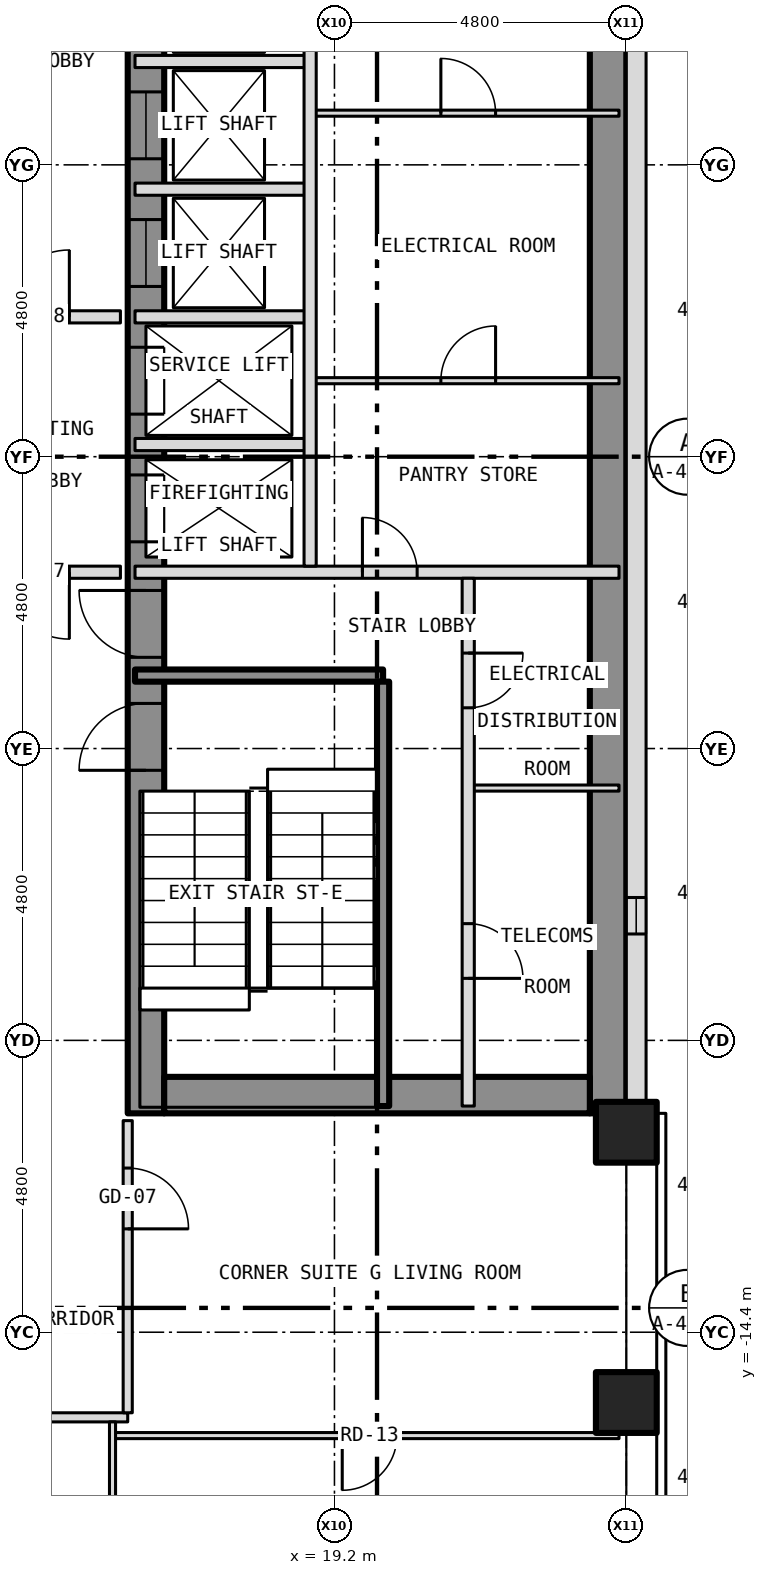
"""IFC4 building model, lengths in metres.
Left out: names, types, materials, properties, quantities, classifications, styles, units other than length and angle.
Written with IfcOpenShell. Run it as: python <this file> out.ifc"""

import sys

from ifc_helpers import new_model, si_unit, direction, frame, frame_2d, origin, origin_2d, place, context, subcontext, project, spatial, rectangle, hollow_rectangle, extrude, element, fill, save


model = new_model("IFC4")
c1 = context("Model", 3, precision=1e-05, world=origin(), true_north=direction((0.0, 1.0)))
c2 = subcontext(c1, "Body", "Model", "MODEL_VIEW")
j1 = project(units=[si_unit("LENGTHUNIT", "METRE"), si_unit("PLANEANGLEUNIT", "RADIAN")], contexts=[c1])
p1 = place(None, origin())
s1 = spatial("IfcSite", under=j1, at=p1, CompositionType="ELEMENT")
p2 = place(p1, origin())
s2 = spatial("IfcBuilding", under=s1, at=p2, CompositionType="ELEMENT")
p3 = place(p2, frame((0.0, 0.0, 70.5)))
s3 = spatial("IfcBuildingStorey", under=s2, at=p3, CompositionType="ELEMENT", Elevation=70.5)
for number, where, z_axis, x_axis in (
    (1, (24.0, -15.556, -0.15), (0.0, 0.0, 1.0), (1.0, 0.0, 0.0)),
    (2, (24.0, -11.111, -0.15), (0.0, 0.0, 1.0), (1.0, 0.0, 0.0)),
):
    element("IfcColumn", number, at=place(p3, frame(where, z_axis=z_axis, x_axis=x_axis)), inside=s3, PredefinedType="COLUMN", context=c2, shape_type="SweptSolid", body=[
        extrude(hollow_rectangle(XDim=1.0, YDim=1.0, WallThickness=0.06, at=origin_2d()), origin(), (0.0, 0.0, 1.0), 3.5),
    ])
p4 = place(p3, frame((16.1, -10.8, 0.0), z_axis=(0.0, 0.0, 1.0), x_axis=(0.0, 1.0, 0.0)))
e3 = element("IfcWall", 3, at=p4, inside=s3, PredefinedType="SHEAR", context=c2, shape_type="SweptSolid", body=[
    extrude(rectangle(XDim=21.6, YDim=0.6, at=frame_2d((10.8, 0.0))), origin(), (0.0, 0.0, 1.0), 3.25),
])
p5 = place(p4, frame((9.4, 0.0, 0.0)))
e4 = element("IfcOpeningElement", 4, at=p5, cuts=e3, PredefinedType="OPENING", context=c2, shape_type="SweptSolid", body=[
    extrude(rectangle(XDim=1.1, YDim=2.1, at=frame_2d((0.55, 1.05))), frame((0.0, 0.312, 0.0), z_axis=(0.0, -1.0, 0.0), x_axis=(1.0, 0.0, 0.0)), (0.0, 0.0, 1.0), 0.624),
])
p6 = place(p4, frame((11.5, 0.0, 0.0)))
e5 = element("IfcOpeningElement", 5, at=p6, cuts=e3, PredefinedType="OPENING", context=c2, shape_type="SweptSolid", body=[
    extrude(rectangle(XDim=1.1, YDim=2.1, at=frame_2d((0.55, 1.05))), frame((0.0, 0.312, 0.0), z_axis=(0.0, -1.0, 0.0), x_axis=(1.0, 0.0, 0.0)), (0.0, 0.0, 1.0), 0.624),
])
p7 = place(p4, frame((13.6, 0.0, 0.0)))
e6 = element("IfcOpeningElement", 6, at=p7, cuts=e3, PredefinedType="OPENING", context=c2, shape_type="SweptSolid", body=[
    extrude(rectangle(XDim=1.1, YDim=2.1, at=frame_2d((0.55, 1.05))), frame((0.0, 0.312, 0.0), z_axis=(0.0, -1.0, 0.0), x_axis=(1.0, 0.0, 0.0)), (0.0, 0.0, 1.0), 0.624),
])
p8 = place(p4, frame((15.7, 0.0, 0.0)))
e7 = element("IfcOpeningElement", 7, at=p8, cuts=e3, PredefinedType="OPENING", context=c2, shape_type="SweptSolid", body=[
    extrude(rectangle(XDim=1.1, YDim=2.1, at=frame_2d((0.55, 1.05))), frame((0.0, 0.312, 0.0), z_axis=(0.0, -1.0, 0.0), x_axis=(1.0, 0.0, 0.0)), (0.0, 0.0, 1.0), 0.624),
])
p9 = place(p4, frame((17.8, 0.0, 0.0)))
e8 = element("IfcOpeningElement", 8, at=p9, cuts=e3, PredefinedType="OPENING", context=c2, shape_type="SweptSolid", body=[
    extrude(rectangle(XDim=1.1, YDim=2.1, at=frame_2d((0.55, 1.05))), frame((0.0, 0.312, 0.0), z_axis=(0.0, -1.0, 0.0), x_axis=(1.0, 0.0, 0.0)), (0.0, 0.0, 1.0), 0.624),
])
p10 = place(p4, frame((5.642, 0.0, 0.0)))
e9 = element("IfcOpeningElement", 9, at=p10, cuts=e3, PredefinedType="OPENING", context=c2, shape_type="SweptSolid", body=[
    extrude(rectangle(XDim=1.1, YDim=2.1, at=frame_2d((0.55, 1.05))), frame((0.0, 0.312, 0.0), z_axis=(0.0, -1.0, 0.0), x_axis=(1.0, 0.0, 0.0)), (0.0, 0.0, 1.0), 0.624),
])
p11 = place(p4, frame((7.5, 0.0, 0.0)))
e10 = element("IfcOpeningElement", 10, at=p11, cuts=e3, PredefinedType="OPENING", context=c2, shape_type="SweptSolid", body=[
    extrude(rectangle(XDim=1.1, YDim=2.1, at=frame_2d((0.55, 1.05))), frame((0.0, 0.312, 0.0), z_axis=(0.0, -1.0, 0.0), x_axis=(1.0, 0.0, 0.0)), (0.0, 0.0, 1.0), 0.624),
])
p12 = place(p3, frame((23.7, -10.8, 0.0), z_axis=(0.0, 0.0, 1.0), x_axis=(0.0, 1.0, 0.0)))
e11 = element("IfcWall", 11, at=p12, inside=s3, PredefinedType="SHEAR", context=c2, shape_type="SweptSolid", body=[
    extrude(rectangle(XDim=21.6, YDim=0.6, at=frame_2d((10.8, 0.0))), origin(), (0.0, 0.0, 1.0), 3.25),
])
p13 = place(p3, frame((16.4, -10.5, 0.0), z_axis=(0.0, 0.0, 1.0), x_axis=(1.0, 0.0, 0.0)))
e12 = element("IfcWall", 12, at=p13, inside=s3, PredefinedType="SHEAR", context=c2, shape_type="SweptSolid", body=[
    extrude(rectangle(XDim=7.0, YDim=0.6, at=frame_2d((3.5, 0.0))), origin(), (0.0, 0.0, 1.0), 3.25),
])
p14 = place(p3, frame((24.163, -10.8, 0.0), z_axis=(0.0, 0.0, 1.0), x_axis=(0.0, 1.0, 0.0)))
e13 = element("IfcWall", 13, at=p14, inside=s3, PredefinedType="SOLIDWALL", context=c2, shape_type="SweptSolid", body=[
    extrude(rectangle(XDim=21.6, YDim=0.325, at=frame_2d((10.8, 0.0))), origin(), (0.0, 0.0, 1.0), 3.5),
])
p15 = place(p14, frame((2.95, 0.0, 1.0)))
e14 = element("IfcOpeningElement", 14, at=p15, cuts=e13, PredefinedType="OPENING", context=c2, shape_type="SweptSolid", body=[
    extrude(rectangle(XDim=0.6, YDim=1.5, at=frame_2d((0.3, 0.75))), frame((0.0, 0.175, 0.0), z_axis=(0.0, -1.0, 0.0), x_axis=(1.0, 0.0, 0.0)), (0.0, 0.0, 1.0), 0.349),
])
p16 = place(p3, frame((15.55, -16.1, 0.0), z_axis=(0.0, 0.0, 1.0), x_axis=(1.0, 0.0, 0.0)))
e15 = element("IfcWall", 15, at=p16, inside=s3, PredefinedType="PARTITIONING", context=c2, shape_type="SweptSolid", body=[
    extrude(rectangle(XDim=8.33, YDim=0.1, at=frame_2d((4.165, 0.0))), origin(), (0.0, 0.0, 1.0), 3.35),
])
p17 = place(p16, frame((3.778, 0.0, 0.0)))
e16 = element("IfcOpeningElement", 16, at=p17, cuts=e15, PredefinedType="OPENING", context=c2, shape_type="SweptSolid", body=[
    extrude(rectangle(XDim=0.9, YDim=2.1, at=frame_2d((0.45, 1.05))), frame((0.0, 0.062, 0.0), z_axis=(0.0, -1.0, 0.0), x_axis=(1.0, 0.0, 0.0)), (0.0, 0.0, 1.0), 0.124),
])
p18 = place(p3, frame((9.15, -15.8, 0.0), z_axis=(0.0, 0.0, 1.0), x_axis=(1.0, 0.0, 0.0)))
e17 = element("IfcWall", 17, at=p18, inside=s3, PredefinedType="PARTITIONING", context=c2, shape_type="SweptSolid", body=[
    extrude(rectangle(XDim=6.65, YDim=0.15, at=frame_2d((3.325, 0.0))), origin(), (0.0, 0.0, 1.0), 3.35),
])
p19 = place(p18, frame((3.803, 0.0, 0.0)))
e18 = element("IfcOpeningElement", 18, at=p19, cuts=e17, PredefinedType="OPENING", context=c2, shape_type="SweptSolid", body=[
    extrude(rectangle(XDim=1.0, YDim=2.1, at=frame_2d((0.5, 1.05))), frame((0.0, 0.087, 0.0), z_axis=(0.0, -1.0, 0.0), x_axis=(1.0, 0.0, 0.0)), (0.0, 0.0, 1.0), 0.174),
])
p20 = place(p3, frame((21.4, -5.45, 0.0), z_axis=(0.0, 0.0, 1.0), x_axis=(1.0, 0.0, 0.0)))
e19 = element("IfcWall", 19, at=p20, inside=s3, PredefinedType="PARTITIONING", context=c2, shape_type="SweptSolid", body=[
    extrude(rectangle(XDim=2.48, YDim=0.1, at=frame_2d((1.24, 0.0))), origin(), (0.0, 0.0, 1.0), 3.25),
])
p21 = place(p3, frame((15.92, -3.6, 0.0), z_axis=(0.0, 0.0, 1.0), x_axis=(1.0, 0.0, 0.0)))
e20 = element("IfcWall", 20, at=p21, inside=s3, PredefinedType="SHEAR", context=c2, shape_type="SweptSolid", body=[
    extrude(rectangle(XDim=4.08, YDim=0.2, at=frame_2d((2.04, 0.0))), origin(), (0.0, 0.0, 1.0), 3.25),
])
p22 = place(p3, frame((12.4, -1.9, 0.0), z_axis=(0.0, 0.0, 1.0), x_axis=(1.0, 0.0, 0.0)))
e21 = element("IfcWall", 21, at=p22, inside=s3, PredefinedType="PARTITIONING", context=c2, shape_type="SweptSolid", body=[
    extrude(rectangle(XDim=3.28, YDim=0.2, at=frame_2d((1.64, 0.0))), origin(), (0.0, 0.0, 1.0), 3.35),
])
p23 = place(p22, frame((1.34, 0.0, 0.0)))
e22 = element("IfcOpeningElement", 22, at=p23, cuts=e21, PredefinedType="OPENING", context=c2, shape_type="SweptSolid", body=[
    extrude(rectangle(XDim=1.1, YDim=2.1, at=frame_2d((0.55, 1.05))), frame((0.0, 0.112, 0.0), z_axis=(0.0, -1.0, 0.0), x_axis=(1.0, 0.0, 0.0)), (0.0, 0.0, 1.0), 0.224),
])
p24 = place(p3, frame((15.92, -1.9, 0.0), z_axis=(0.0, 0.0, 1.0), x_axis=(1.0, 0.0, 0.0)))
e23 = element("IfcWall", 23, at=p24, inside=s3, PredefinedType="PARTITIONING", context=c2, shape_type="SweptSolid", body=[
    extrude(rectangle(XDim=7.96, YDim=0.2, at=frame_2d((3.98, 0.0))), origin(), (0.0, 0.0, 1.0), 3.25),
])
p25 = place(p24, frame((3.74, 0.0, 0.0)))
e24 = element("IfcOpeningElement", 24, at=p25, cuts=e23, PredefinedType="OPENING", context=c2, shape_type="SweptSolid", body=[
    extrude(rectangle(XDim=0.9, YDim=2.1, at=frame_2d((0.45, 1.05))), frame((0.0, 0.112, 0.0), z_axis=(0.0, -1.0, 0.0), x_axis=(1.0, 0.0, 0.0)), (0.0, 0.0, 1.0), 0.224),
])
p26 = place(p3, frame((15.92, 0.2, 0.0), z_axis=(0.0, 0.0, 1.0), x_axis=(1.0, 0.0, 0.0)))
e25 = element("IfcWall", 25, at=p26, inside=s3, PredefinedType="PARTITIONING", context=c2, shape_type="SweptSolid", body=[
    extrude(rectangle(XDim=2.88, YDim=0.2, at=frame_2d((1.44, 0.0))), origin(), (0.0, 0.0, 1.0), 3.25),
])
p27 = place(p3, frame((18.8, 1.25, 0.0), z_axis=(0.0, 0.0, 1.0), x_axis=(1.0, 0.0, 0.0)))
e26 = element("IfcWall", 26, at=p27, inside=s3, PredefinedType="PARTITIONING", context=c2, shape_type="SweptSolid", body=[
    extrude(rectangle(XDim=5.08, YDim=0.1, at=frame_2d((2.54, 0.0))), origin(), (0.0, 0.0, 1.0), 3.25),
])
p28 = place(p27, frame((2.15, 0.0, 0.0)))
e27 = element("IfcOpeningElement", 27, at=p28, cuts=e26, PredefinedType="OPENING", context=c2, shape_type="SweptSolid", body=[
    extrude(rectangle(XDim=0.9, YDim=2.1, at=frame_2d((0.45, 1.05))), frame((0.0, 0.062, 0.0), z_axis=(0.0, -1.0, 0.0), x_axis=(1.0, 0.0, 0.0)), (0.0, 0.0, 1.0), 0.124),
])
p29 = place(p3, frame((12.4, 2.3, 0.0), z_axis=(0.0, 0.0, 1.0), x_axis=(1.0, 0.0, 0.0)))
e28 = element("IfcWall", 28, at=p29, inside=s3, PredefinedType="PARTITIONING", context=c2, shape_type="SweptSolid", body=[
    extrude(rectangle(XDim=3.28, YDim=0.2, at=frame_2d((1.64, 0.0))), origin(), (0.0, 0.0, 1.0), 3.35),
])
p30 = place(p29, frame((1.34, 0.0, 0.0)))
e29 = element("IfcOpeningElement", 29, at=p30, cuts=e28, PredefinedType="OPENING", context=c2, shape_type="SweptSolid", body=[
    extrude(rectangle(XDim=1.1, YDim=2.1, at=frame_2d((0.55, 1.05))), frame((0.0, 0.112, 0.0), z_axis=(0.0, -1.0, 0.0), x_axis=(1.0, 0.0, 0.0)), (0.0, 0.0, 1.0), 0.224),
])
for number, where, z_axis, x_axis in (
    (30, (15.92, 2.3, 0.0), (0.0, 0.0, 1.0), (1.0, 0.0, 0.0)),
    (31, (15.92, 4.4, 0.0), (0.0, 0.0, 1.0), (1.0, 0.0, 0.0)),
):
    element("IfcWall", number, at=place(p3, frame(where, z_axis=z_axis, x_axis=x_axis)), inside=s3, PredefinedType="PARTITIONING", context=c2, shape_type="SweptSolid", body=[
        extrude(rectangle(XDim=2.88, YDim=0.2, at=frame_2d((1.44, 0.0))), origin(), (0.0, 0.0, 1.0), 3.25),
    ])
p31 = place(p3, frame((18.8, 5.65, 0.0), z_axis=(0.0, 0.0, 1.0), x_axis=(1.0, 0.0, 0.0)))
e32 = element("IfcWall", 32, at=p31, inside=s3, PredefinedType="PARTITIONING", context=c2, shape_type="SweptSolid", body=[
    extrude(rectangle(XDim=5.08, YDim=0.1, at=frame_2d((2.54, 0.0))), origin(), (0.0, 0.0, 1.0), 3.25),
])
p32 = place(p31, frame((2.15, 0.0, 0.0)))
e33 = element("IfcOpeningElement", 33, at=p32, cuts=e32, PredefinedType="OPENING", context=c2, shape_type="SweptSolid", body=[
    extrude(rectangle(XDim=0.9, YDim=2.1, at=frame_2d((0.45, 1.05))), frame((0.0, 0.062, 0.0), z_axis=(0.0, -1.0, 0.0), x_axis=(1.0, 0.0, 0.0)), (0.0, 0.0, 1.0), 0.124),
])
p33 = place(p3, frame((15.92, 6.5, 0.0), z_axis=(0.0, 0.0, 1.0), x_axis=(1.0, 0.0, 0.0)))
e34 = element("IfcWall", 34, at=p33, inside=s3, PredefinedType="PARTITIONING", context=c2, shape_type="SweptSolid", body=[
    extrude(rectangle(XDim=2.88, YDim=0.2, at=frame_2d((1.44, 0.0))), origin(), (0.0, 0.0, 1.0), 3.25),
])
p34 = place(p3, frame((15.55, -23.88, 0.0), z_axis=(0.0, 0.0, 1.0), x_axis=(0.0, 1.0, 0.0)))
e35 = element("IfcWall", 35, at=p34, inside=s3, PredefinedType="PARTITIONING", context=c2, shape_type="SweptSolid", body=[
    extrude(rectangle(XDim=8.005, YDim=0.1, at=frame_2d((4.002, 0.0))), origin(), (0.0, 0.0, 1.0), 3.35),
])
p35 = place(p3, frame((15.8, -15.725, 0.0), z_axis=(0.0, 0.0, 1.0), x_axis=(0.0, 1.0, 0.0)))
e36 = element("IfcWall", 36, at=p35, inside=s3, PredefinedType="PARTITIONING", context=c2, shape_type="SweptSolid", body=[
    extrude(rectangle(XDim=4.805, YDim=0.15, at=frame_2d((2.403, 0.0))), origin(), (0.0, 0.0, 1.0), 3.35),
])
p36 = place(p35, frame((3.025, 0.0, 0.0)))
e37 = element("IfcOpeningElement", 37, at=p36, cuts=e36, PredefinedType="OPENING", context=c2, shape_type="SweptSolid", body=[
    extrude(rectangle(XDim=1.0, YDim=2.1, at=frame_2d((0.5, 1.05))), frame((0.0, 0.087, 0.0), z_axis=(0.0, -1.0, 0.0), x_axis=(1.0, 0.0, 0.0)), (0.0, 0.0, 1.0), 0.174),
])
p37 = place(p3, frame((18.8, -1.8, 0.0), z_axis=(0.0, 0.0, 1.0), x_axis=(0.0, 1.0, 0.0)))
e38 = element("IfcWall", 38, at=p37, inside=s3, PredefinedType="PARTITIONING", context=c2, shape_type="SweptSolid", body=[
    extrude(rectangle(XDim=12.48, YDim=0.2, at=frame_2d((6.24, 0.0))), origin(), (0.0, 0.0, 1.0), 3.25),
])
p38 = place(p3, frame((20.0, -10.68, 0.0), z_axis=(0.0, 0.0, 1.0), x_axis=(0.0, 1.0, 0.0)))
e39 = element("IfcWall", 39, at=p38, inside=s3, PredefinedType="SHEAR", context=c2, shape_type="SweptSolid", body=[
    extrude(rectangle(XDim=6.98, YDim=0.2, at=frame_2d((3.49, 0.0))), origin(), (0.0, 0.0, 1.0), 3.25),
])
p39 = place(p3, frame((21.4, -10.68, 0.0), z_axis=(0.0, 0.0, 1.0), x_axis=(0.0, 1.0, 0.0)))
e40 = element("IfcWall", 40, at=p39, inside=s3, PredefinedType="PARTITIONING", context=c2, shape_type="SweptSolid", body=[
    extrude(rectangle(XDim=8.68, YDim=0.2, at=frame_2d((4.34, 0.0))), origin(), (0.0, 0.0, 1.0), 3.25),
])
p40 = place(p39, frame((2.1, 0.0, 0.0)))
e41 = element("IfcOpeningElement", 41, at=p40, cuts=e40, PredefinedType="OPENING", context=c2, shape_type="SweptSolid", body=[
    extrude(rectangle(XDim=0.9, YDim=2.1, at=frame_2d((0.45, 1.05))), frame((0.0, 0.112, 0.0), z_axis=(0.0, -1.0, 0.0), x_axis=(1.0, 0.0, 0.0)), (0.0, 0.0, 1.0), 0.224),
])
p41 = place(p39, frame((6.55, 0.0, 0.0)))
e42 = element("IfcOpeningElement", 42, at=p41, cuts=e40, PredefinedType="OPENING", context=c2, shape_type="SweptSolid", body=[
    extrude(rectangle(XDim=0.9, YDim=2.1, at=frame_2d((0.45, 1.05))), frame((0.0, 0.112, 0.0), z_axis=(0.0, -1.0, 0.0), x_axis=(1.0, 0.0, 0.0)), (0.0, 0.0, 1.0), 0.224),
])
p42 = place(p15, origin())
e43 = element("IfcWindow", 43, at=p42, inside=s3, PartitioningType="SINGLE_PANEL", PredefinedType="WINDOW", context=c2, shape_type="SweptSolid", body=[
    extrude(rectangle(XDim=0.6, YDim=1.5, at=frame_2d((0.3, 0.75))), frame((0.0, -0.073, 0.0), z_axis=(0.0, -1.0, 0.0), x_axis=(1.0, 0.0, 0.0)), (0.0, 0.0, 1.0), 0.06),
])
fill(e14, e43)
p43 = place(p5, origin())
e44 = element("IfcDoor", 44, at=p43, inside=s3, OperationType="SLIDING_TO_LEFT", PredefinedType="DOOR", context=c2, shape_type="SweptSolid", body=[
    extrude(rectangle(XDim=1.1, YDim=2.1, at=frame_2d((0.55, 1.05))), frame((0.0, 0.025, 0.0), z_axis=(0.0, -1.0, 0.0), x_axis=(1.0, 0.0, 0.0)), (0.0, 0.0, 1.0), 0.05),
])
fill(e4, e44)
p44 = place(p6, origin())
e45 = element("IfcDoor", 45, at=p44, inside=s3, OperationType="SLIDING_TO_LEFT", PredefinedType="DOOR", context=c2, shape_type="SweptSolid", body=[
    extrude(rectangle(XDim=1.1, YDim=2.1, at=frame_2d((0.55, 1.05))), frame((0.0, 0.025, 0.0), z_axis=(0.0, -1.0, 0.0), x_axis=(1.0, 0.0, 0.0)), (0.0, 0.0, 1.0), 0.05),
])
fill(e5, e45)
p45 = place(p7, origin())
e46 = element("IfcDoor", 46, at=p45, inside=s3, OperationType="SLIDING_TO_LEFT", PredefinedType="DOOR", context=c2, shape_type="SweptSolid", body=[
    extrude(rectangle(XDim=1.1, YDim=2.1, at=frame_2d((0.55, 1.05))), frame((0.0, 0.025, 0.0), z_axis=(0.0, -1.0, 0.0), x_axis=(1.0, 0.0, 0.0)), (0.0, 0.0, 1.0), 0.05),
])
fill(e6, e46)
p46 = place(p8, origin())
e47 = element("IfcDoor", 47, at=p46, inside=s3, OperationType="SLIDING_TO_LEFT", PredefinedType="DOOR", context=c2, shape_type="SweptSolid", body=[
    extrude(rectangle(XDim=1.1, YDim=2.1, at=frame_2d((0.55, 1.05))), frame((0.0, 0.025, 0.0), z_axis=(0.0, -1.0, 0.0), x_axis=(1.0, 0.0, 0.0)), (0.0, 0.0, 1.0), 0.05),
])
fill(e7, e47)
p47 = place(p10, origin())
e48 = element("IfcDoor", 48, at=p47, inside=s3, OperationType="SINGLE_SWING_LEFT", PredefinedType="DOOR", context=c2, shape_type="SweptSolid", body=[
    extrude(rectangle(XDim=1.1, YDim=2.1, at=frame_2d((0.55, 1.05))), frame((0.0, 0.025, 0.0), z_axis=(0.0, -1.0, 0.0), x_axis=(1.0, 0.0, 0.0)), (0.0, 0.0, 1.0), 0.05),
])
fill(e9, e48)
p48 = place(p11, origin())
e49 = element("IfcDoor", 49, at=p48, inside=s3, OperationType="SINGLE_SWING_RIGHT", PredefinedType="DOOR", context=c2, shape_type="SweptSolid", body=[
    extrude(rectangle(XDim=1.1, YDim=2.1, at=frame_2d((0.55, 1.05))), frame((0.0, 0.025, 0.0), z_axis=(0.0, -1.0, 0.0), x_axis=(1.0, 0.0, 0.0)), (0.0, 0.0, 1.0), 0.05),
])
fill(e10, e49)
p49 = place(p40, origin())
e50 = element("IfcDoor", 50, at=p49, inside=s3, OperationType="SINGLE_SWING_LEFT", PredefinedType="DOOR", context=c2, shape_type="SweptSolid", body=[
    extrude(rectangle(XDim=0.9, YDim=2.1, at=frame_2d((0.45, 1.05))), frame((0.0, 0.025, 0.0), z_axis=(0.0, -1.0, 0.0), x_axis=(1.0, 0.0, 0.0)), (0.0, 0.0, 1.0), 0.05),
])
fill(e41, e50)
p50 = place(p41, origin())
e51 = element("IfcDoor", 51, at=p50, inside=s3, OperationType="SINGLE_SWING_RIGHT", PredefinedType="DOOR", context=c2, shape_type="SweptSolid", body=[
    extrude(rectangle(XDim=0.9, YDim=2.1, at=frame_2d((0.45, 1.05))), frame((0.0, 0.025, 0.0), z_axis=(0.0, -1.0, 0.0), x_axis=(1.0, 0.0, 0.0)), (0.0, 0.0, 1.0), 0.05),
])
fill(e42, e51)
p51 = place(p25, origin())
e52 = element("IfcDoor", 52, at=p51, inside=s3, OperationType="SINGLE_SWING_LEFT", PredefinedType="DOOR", context=c2, shape_type="SweptSolid", body=[
    extrude(rectangle(XDim=0.9, YDim=2.1, at=frame_2d((0.45, 1.05))), frame((0.0, 0.025, 0.0), z_axis=(0.0, -1.0, 0.0), x_axis=(1.0, 0.0, 0.0)), (0.0, 0.0, 1.0), 0.05),
])
fill(e24, e52)
p52 = place(p28, origin())
e53 = element("IfcDoor", 53, at=p52, inside=s3, OperationType="SINGLE_SWING_RIGHT", PredefinedType="DOOR", context=c2, shape_type="SweptSolid", body=[
    extrude(rectangle(XDim=0.9, YDim=2.1, at=frame_2d((0.45, 1.05))), frame((0.0, 0.025, 0.0), z_axis=(0.0, -1.0, 0.0), x_axis=(1.0, 0.0, 0.0)), (0.0, 0.0, 1.0), 0.05),
])
fill(e27, e53)
p53 = place(p32, origin())
e54 = element("IfcDoor", 54, at=p53, inside=s3, OperationType="SINGLE_SWING_LEFT", PredefinedType="DOOR", context=c2, shape_type="SweptSolid", body=[
    extrude(rectangle(XDim=0.9, YDim=2.1, at=frame_2d((0.45, 1.05))), frame((0.0, 0.025, 0.0), z_axis=(0.0, -1.0, 0.0), x_axis=(1.0, 0.0, 0.0)), (0.0, 0.0, 1.0), 0.05),
])
fill(e33, e54)
p54 = place(p23, origin())
e55 = element("IfcDoor", 55, at=p54, inside=s3, OperationType="SINGLE_SWING_RIGHT", PredefinedType="DOOR", context=c2, shape_type="SweptSolid", body=[
    extrude(rectangle(XDim=1.1, YDim=2.1, at=frame_2d((0.55, 1.05))), frame((0.0, 0.025, 0.0), z_axis=(0.0, -1.0, 0.0), x_axis=(1.0, 0.0, 0.0)), (0.0, 0.0, 1.0), 0.05),
])
fill(e22, e55)
p55 = place(p30, origin())
e56 = element("IfcDoor", 56, at=p55, inside=s3, OperationType="SINGLE_SWING_RIGHT", PredefinedType="DOOR", context=c2, shape_type="SweptSolid", body=[
    extrude(rectangle(XDim=1.1, YDim=2.1, at=frame_2d((0.55, 1.05))), frame((0.0, 0.025, 0.0), z_axis=(0.0, -1.0, 0.0), x_axis=(1.0, 0.0, 0.0)), (0.0, 0.0, 1.0), 0.05),
])
fill(e29, e56)
p56 = place(p36, origin())
e57 = element("IfcDoor", 57, at=p56, inside=s3, OperationType="SINGLE_SWING_LEFT", PredefinedType="DOOR", context=c2, shape_type="SweptSolid", body=[
    extrude(rectangle(XDim=1.0, YDim=2.1, at=frame_2d((0.5, 1.05))), frame((0.0, 0.025, 0.0), z_axis=(0.0, -1.0, 0.0), x_axis=(1.0, 0.0, 0.0)), (0.0, 0.0, 1.0), 0.05),
])
fill(e37, e57)
p57 = place(p17, origin())
e58 = element("IfcDoor", 58, at=p57, inside=s3, OperationType="SINGLE_SWING_LEFT", PredefinedType="DOOR", context=c2, shape_type="SweptSolid", body=[
    extrude(rectangle(XDim=0.9, YDim=2.1, at=frame_2d((0.45, 1.05))), frame((0.0, 0.025, 0.0), z_axis=(0.0, -1.0, 0.0), x_axis=(1.0, 0.0, 0.0)), (0.0, 0.0, 1.0), 0.05),
])
fill(e16, e58)
save(model, sys.argv[1])
